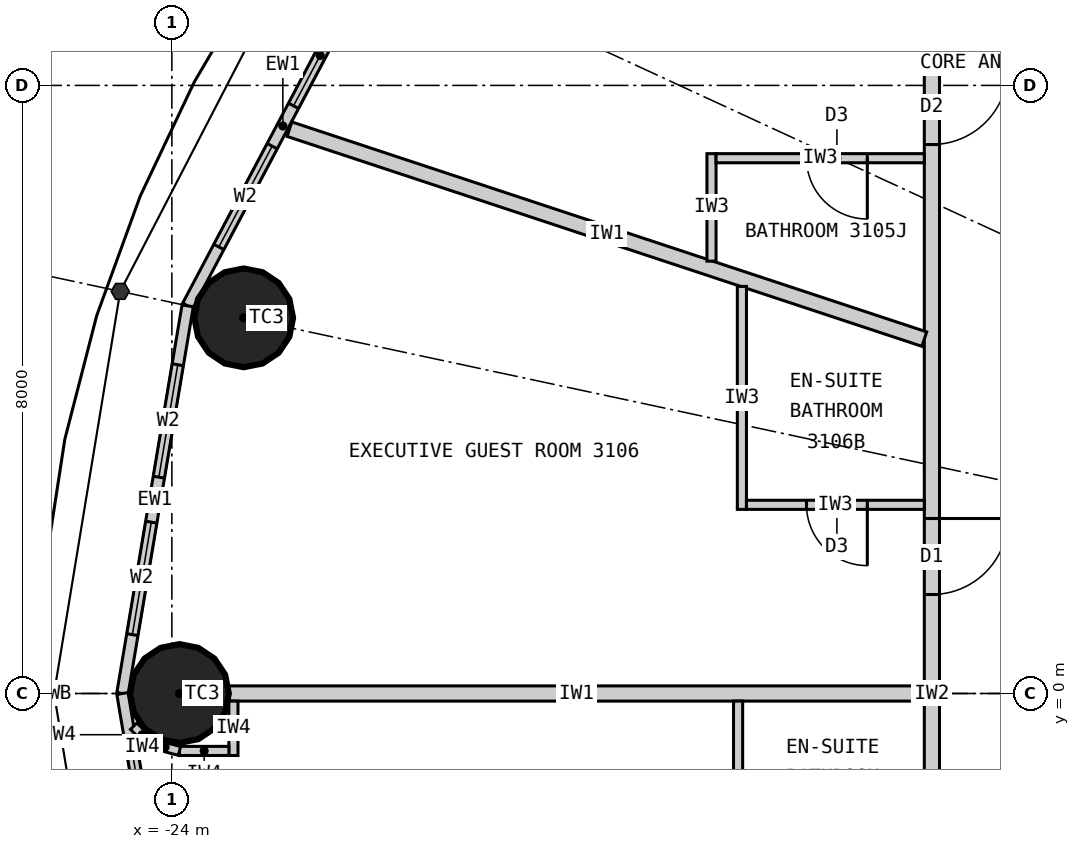
"""IFC4 building model, lengths in metres.
Left out: names, types, materials, properties, quantities, classifications, styles, units other than length and angle.
Written with IfcOpenShell. Run it as: python <this file> out.ifc"""

import sys

from ifc_helpers import new_model, si_unit, direction, frame, frame_2d, origin, origin_2d, place, context, subcontext, project, spatial, rectangle, circle, extrude, element, fill, save


model = new_model("IFC4")
c1 = context("Model", 3, precision=1e-05, world=origin(), true_north=direction((0.0, 1.0)))
c2 = subcontext(c1, "Body", "Model", "MODEL_VIEW")
j1 = project(units=[si_unit("LENGTHUNIT", "METRE"), si_unit("PLANEANGLEUNIT", "RADIAN")], contexts=[c1])
p1 = place(None, origin())
s1 = spatial("IfcSite", under=j1, at=p1, CompositionType="ELEMENT")
p2 = place(p1, origin())
s2 = spatial("IfcBuilding", under=s1, at=p2, CompositionType="ELEMENT")
p3 = place(p2, frame((0.0, 0.0, 122.1)))
s3 = spatial("IfcBuildingStorey", under=s2, at=p3, CompositionType="ELEMENT", Elevation=122.1)
for number, where, z_axis, x_axis in (
    (1, (-23.055, 4.942, 0.0), (0.0, 0.0, 1.0), (1.0, 0.0, 0.0)),
    (2, (-23.9, 0.0, 0.0), (0.0, 0.0, 1.0), (1.0, 0.0, 0.0)),
):
    element("IfcColumn", number, at=place(p3, frame(where, z_axis=z_axis, x_axis=x_axis)), inside=s3, PredefinedType="COLUMN", context=c2, shape_type="SweptSolid", body=[
        extrude(circle(Radius=0.65, at=origin_2d()), origin(), (0.0, 0.0, 1.0), 3.3),
    ])
p4 = place(p3, frame((-21.287, 9.832, 0.0), z_axis=(0.0, 0.0, 1.0), x_axis=(-0.467814388454, -0.883826735257, 0.0)))
e3 = element("IfcWall", 3, at=p4, inside=s3, PredefinedType="ELEMENTEDWALL", context=c2, shape_type="SweptSolid", body=[
    extrude(rectangle(XDim=5.354, YDim=0.15, at=frame_2d((2.677, 0.0))), origin(), (0.0, 0.0, 1.0), 3.12),
])
p5 = place(p4, frame((0.877, 0.0, 0.9)))
e4 = element("IfcOpeningElement", 4, at=p5, cuts=e3, PredefinedType="OPENING", context=c2, shape_type="SweptSolid", body=[
    extrude(rectangle(XDim=1.5, YDim=1.9, at=frame_2d((0.75, 0.95))), frame((0.0, 0.085, 0.0), z_axis=(0.0, -1.0, 0.0), x_axis=(1.0, 0.0, 0.0)), (0.0, 0.0, 1.0), 0.17),
])
p6 = place(p4, frame((2.977, 0.0, 0.9)))
e5 = element("IfcOpeningElement", 5, at=p6, cuts=e3, PredefinedType="OPENING", context=c2, shape_type="SweptSolid", body=[
    extrude(rectangle(XDim=1.5, YDim=1.9, at=frame_2d((0.75, 0.95))), frame((0.0, 0.085, 0.0), z_axis=(0.0, -1.0, 0.0), x_axis=(1.0, 0.0, 0.0)), (0.0, 0.0, 1.0), 0.17),
])
p7 = place(p3, frame((-23.792, 5.1, 0.0), z_axis=(0.0, 0.0, 1.0), x_axis=(-0.165883894218, -0.986145290329, 0.0)))
e6 = element("IfcWall", 6, at=p7, inside=s3, PredefinedType="ELEMENTEDWALL", context=c2, shape_type="SweptSolid", body=[
    extrude(rectangle(XDim=5.172, YDim=0.15, at=frame_2d((2.586, 0.0))), origin(), (0.0, 0.0, 1.0), 3.12),
])
p8 = place(p7, frame((0.786, 0.0, 0.9)))
e7 = element("IfcOpeningElement", 7, at=p8, cuts=e6, PredefinedType="OPENING", context=c2, shape_type="SweptSolid", body=[
    extrude(rectangle(XDim=1.5, YDim=1.9, at=frame_2d((0.75, 0.95))), frame((0.0, 0.085, 0.0), z_axis=(0.0, -1.0, 0.0), x_axis=(1.0, 0.0, 0.0)), (0.0, 0.0, 1.0), 0.17),
])
p9 = place(p7, frame((2.886, 0.0, 0.9)))
e8 = element("IfcOpeningElement", 8, at=p9, cuts=e6, PredefinedType="OPENING", context=c2, shape_type="SweptSolid", body=[
    extrude(rectangle(XDim=1.5, YDim=1.9, at=frame_2d((0.75, 0.95))), frame((0.0, 0.085, 0.0), z_axis=(0.0, -1.0, 0.0), x_axis=(1.0, 0.0, 0.0)), (0.0, 0.0, 1.0), 0.17),
])
p10 = place(p3, frame((-24.65, 0.0, 0.0), z_axis=(0.0, 0.0, 1.0), x_axis=(0.165883894218, -0.986145290329, 0.0)))
e9 = element("IfcWall", 9, at=p10, inside=s3, PredefinedType="ELEMENTEDWALL", context=c2, shape_type="SweptSolid", body=[
    extrude(rectangle(XDim=5.172, YDim=0.15, at=frame_2d((2.586, 0.0))), origin(), (0.0, 0.0, 1.0), 3.12),
])
p11 = place(p10, frame((0.786, 0.0, 0.9)))
e10 = element("IfcOpeningElement", 10, at=p11, cuts=e9, PredefinedType="OPENING", context=c2, shape_type="SweptSolid", body=[
    extrude(rectangle(XDim=1.5, YDim=1.9, at=frame_2d((0.75, 0.95))), frame((0.0, 0.085, 0.0), z_axis=(0.0, -1.0, 0.0), x_axis=(1.0, 0.0, 0.0)), (0.0, 0.0, 1.0), 0.17),
])
p12 = place(p10, frame((2.886, 0.0, 0.9)))
e11 = element("IfcOpeningElement", 11, at=p12, cuts=e9, PredefinedType="OPENING", context=c2, shape_type="SweptSolid", body=[
    extrude(rectangle(XDim=1.5, YDim=1.9, at=frame_2d((0.75, 0.95))), frame((0.0, 0.085, 0.0), z_axis=(0.0, -1.0, 0.0), x_axis=(1.0, 0.0, 0.0)), (0.0, 0.0, 1.0), 0.17),
])
p13 = place(p3, frame((-14.0, 9.9, 0.0), z_axis=(0.0, 0.0, 1.0), x_axis=(0.0, -1.0, 0.0)))
e12 = element("IfcWall", 12, at=p13, inside=s3, PredefinedType="PARTITIONING", context=c2, shape_type="SweptSolid", body=[
    extrude(rectangle(XDim=19.8, YDim=0.2, at=frame_2d((9.9, 0.0))), origin(), (0.0, 0.0, 1.0), 3.12),
])
p14 = place(p13, frame((1.678, 0.0, 0.0)))
e13 = element("IfcOpeningElement", 13, at=p14, cuts=e12, PredefinedType="OPENING", context=c2, shape_type="SweptSolid", body=[
    extrude(rectangle(XDim=1.0, YDim=2.2, at=frame_2d((0.5, 1.1))), frame((0.0, 0.11, 0.0), z_axis=(0.0, -1.0, 0.0), x_axis=(1.0, 0.0, 0.0)), (0.0, 0.0, 1.0), 0.22),
])
p15 = place(p13, frame((7.598, 0.0, 0.0)))
e14 = element("IfcOpeningElement", 14, at=p15, cuts=e12, PredefinedType="OPENING", context=c2, shape_type="SweptSolid", body=[
    extrude(rectangle(XDim=1.0, YDim=2.2, at=frame_2d((0.5, 1.1))), frame((0.0, 0.11, 0.0), z_axis=(0.0, -1.0, 0.0), x_axis=(1.0, 0.0, 0.0)), (0.0, 0.0, 1.0), 0.22),
])
p16 = place(p13, frame((12.26, 0.0, 0.0)))
e15 = element("IfcOpeningElement", 15, at=p16, cuts=e12, PredefinedType="OPENING", context=c2, shape_type="SweptSolid", body=[
    extrude(rectangle(XDim=1.0, YDim=2.2, at=frame_2d((0.5, 1.1))), frame((0.0, 0.11, 0.0), z_axis=(0.0, -1.0, 0.0), x_axis=(1.0, 0.0, 0.0)), (0.0, 0.0, 1.0), 0.22),
])
p17 = place(p13, frame((16.922, 0.0, 0.0)))
e16 = element("IfcOpeningElement", 16, at=p17, cuts=e12, PredefinedType="OPENING", context=c2, shape_type="SweptSolid", body=[
    extrude(rectangle(XDim=1.0, YDim=2.2, at=frame_2d((0.5, 1.1))), frame((0.0, 0.11, 0.0), z_axis=(0.0, -1.0, 0.0), x_axis=(1.0, 0.0, 0.0)), (0.0, 0.0, 1.0), 0.22),
])
p18 = place(p3, frame((-14.1, 4.662, 0.0), z_axis=(0.0, 0.0, 1.0), x_axis=(-0.949446466373, 0.313928984789, 0.0)))
e17 = element("IfcWall", 17, at=p18, inside=s3, PredefinedType="PARTITIONING", context=c2, shape_type="SweptSolid", body=[
    extrude(rectangle(XDim=8.797, YDim=0.2, at=frame_2d((4.399, 0.0))), origin(), (0.0, 0.0, 1.0), 3.12),
])
p19 = place(p3, frame((-14.1, 0.0, 0.0), z_axis=(0.0, 0.0, 1.0), x_axis=(-1.0, 0.0, 0.0)))
e18 = element("IfcWall", 18, at=p19, inside=s3, PredefinedType="PARTITIONING", context=c2, shape_type="SweptSolid", body=[
    extrude(rectangle(XDim=9.15, YDim=0.2, at=frame_2d((4.575, 0.0))), origin(), (0.0, 0.0, 1.0), 2.32),
])
p20 = place(p3, frame((-16.9, 5.688, 0.0), z_axis=(0.0, 0.0, 1.0), x_axis=(0.0, 1.0, 0.0)))
e19 = element("IfcWall", 19, at=p20, inside=s3, PredefinedType="PARTITIONING", context=c2, shape_type="SweptSolid", body=[
    extrude(rectangle(XDim=1.414, YDim=0.12, at=frame_2d((0.707, 0.0))), origin(), (0.0, 0.0, 1.0), 3.12),
])
p21 = place(p3, frame((-14.1, 7.042, 0.0), z_axis=(0.0, 0.0, 1.0), x_axis=(-1.0, 0.0, 0.0)))
e20 = element("IfcWall", 20, at=p21, inside=s3, PredefinedType="PARTITIONING", context=c2, shape_type="SweptSolid", body=[
    extrude(rectangle(XDim=2.74, YDim=0.12, at=frame_2d((1.37, 0.0))), origin(), (0.0, 0.0, 1.0), 3.12),
])
p22 = place(p21, frame((0.75, 0.0, 0.0)))
e21 = element("IfcOpeningElement", 21, at=p22, cuts=e20, PredefinedType="OPENING", context=c2, shape_type="SweptSolid", body=[
    extrude(rectangle(XDim=0.8, YDim=2.1, at=frame_2d((0.4, 1.05))), frame((0.0, 0.07, 0.0), z_axis=(0.0, -1.0, 0.0), x_axis=(1.0, 0.0, 0.0)), (0.0, 0.0, 1.0), 0.14),
])
p23 = place(p3, frame((-16.5, 5.356, 0.0), z_axis=(0.0, 0.0, 1.0), x_axis=(0.0, -1.0, 0.0)))
e22 = element("IfcWall", 22, at=p23, inside=s3, PredefinedType="PARTITIONING", context=c2, shape_type="SweptSolid", body=[
    extrude(rectangle(XDim=2.934, YDim=0.12, at=frame_2d((1.467, 0.0))), origin(), (0.0, 0.0, 1.0), 3.12),
])
p24 = place(p3, frame((-14.1, 2.482, 0.0), z_axis=(0.0, 0.0, 1.0), x_axis=(-1.0, 0.0, 0.0)))
e23 = element("IfcWall", 23, at=p24, inside=s3, PredefinedType="PARTITIONING", context=c2, shape_type="SweptSolid", body=[
    extrude(rectangle(XDim=2.34, YDim=0.12, at=frame_2d((1.17, 0.0))), origin(), (0.0, 0.0, 1.0), 3.12),
])
p25 = place(p24, frame((0.75, 0.0, 0.0)))
e24 = element("IfcOpeningElement", 24, at=p25, cuts=e23, PredefinedType="OPENING", context=c2, shape_type="SweptSolid", body=[
    extrude(rectangle(XDim=0.8, YDim=2.1, at=frame_2d((0.4, 1.05))), frame((0.0, 0.07, 0.0), z_axis=(0.0, -1.0, 0.0), x_axis=(1.0, 0.0, 0.0)), (0.0, 0.0, 1.0), 0.14),
])
p26 = place(p3, frame((-16.55, -0.1, 0.0), z_axis=(0.0, 0.0, 1.0), x_axis=(0.0, -1.0, 0.0)))
e25 = element("IfcWall", 25, at=p26, inside=s3, PredefinedType="PARTITIONING", context=c2, shape_type="SweptSolid", body=[
    extrude(rectangle(XDim=2.14, YDim=0.12, at=frame_2d((1.07, 0.0))), origin(), (0.0, 0.0, 1.0), 3.12),
])
p27 = place(p3, frame((-23.19, -0.1, 0.0), z_axis=(0.0, 0.0, 1.0), x_axis=(0.0, -1.0, 0.0)))
e26 = element("IfcWall", 26, at=p27, inside=s3, PredefinedType="PARTITIONING", context=c2, shape_type="SweptSolid", body=[
    extrude(rectangle(XDim=0.716, YDim=0.12, at=frame_2d((0.358, 0.0))), origin(), (0.0, 0.0, 1.0), 3.12),
])
p28 = place(p3, frame((-23.25, -0.756, 0.0), z_axis=(0.0, 0.0, 1.0), x_axis=(-1.0, 0.0, 0.0)))
e27 = element("IfcWall", 27, at=p28, inside=s3, PredefinedType="PARTITIONING", context=c2, shape_type="SweptSolid", body=[
    extrude(rectangle(XDim=0.65, YDim=0.12, at=frame_2d((0.325, 0.0))), origin(), (0.0, 0.0, 1.0), 3.12),
])
p29 = place(p3, frame((-23.9, -0.756, 0.0), z_axis=(0.0, 0.0, 1.0), x_axis=(-0.965892334856, 0.2589440045, 0.0)))
e28 = element("IfcWall", 28, at=p29, inside=s3, PredefinedType="PARTITIONING", context=c2, shape_type="SweptSolid", body=[
    extrude(rectangle(XDim=0.391, YDim=0.12, at=frame_2d((0.196, 0.0))), origin(), (0.0, 0.0, 1.0), 3.12),
])
p30 = place(p3, frame((-24.278, -0.655, 0.0), z_axis=(0.0, 0.0, 1.0), x_axis=(-0.707106781187, 0.707106781187, 0.0)))
e29 = element("IfcWall", 29, at=p30, inside=s3, PredefinedType="PARTITIONING", context=c2, shape_type="SweptSolid", body=[
    extrude(rectangle(XDim=0.318, YDim=0.12, at=frame_2d((0.159, 0.0))), origin(), (0.0, 0.0, 1.0), 3.12),
])
p31 = place(p5, origin())
e30 = element("IfcWindow", 30, at=p31, inside=s3, PartitioningType="SINGLE_PANEL", PredefinedType="WINDOW", context=c2, shape_type="SweptSolid", body=[
    extrude(rectangle(XDim=1.5, YDim=1.9, at=frame_2d((0.75, 0.95))), frame((0.0, 0.03, 0.0), z_axis=(0.0, -1.0, 0.0), x_axis=(1.0, 0.0, 0.0)), (0.0, 0.0, 1.0), 0.06),
])
fill(e4, e30)
p32 = place(p6, origin())
e31 = element("IfcWindow", 31, at=p32, inside=s3, PartitioningType="SINGLE_PANEL", PredefinedType="WINDOW", context=c2, shape_type="SweptSolid", body=[
    extrude(rectangle(XDim=1.5, YDim=1.9, at=frame_2d((0.75, 0.95))), frame((0.0, 0.03, 0.0), z_axis=(0.0, -1.0, 0.0), x_axis=(1.0, 0.0, 0.0)), (0.0, 0.0, 1.0), 0.06),
])
fill(e5, e31)
p33 = place(p8, origin())
e32 = element("IfcWindow", 32, at=p33, inside=s3, PartitioningType="SINGLE_PANEL", PredefinedType="WINDOW", context=c2, shape_type="SweptSolid", body=[
    extrude(rectangle(XDim=1.5, YDim=1.9, at=frame_2d((0.75, 0.95))), frame((0.0, 0.03, 0.0), z_axis=(0.0, -1.0, 0.0), x_axis=(1.0, 0.0, 0.0)), (0.0, 0.0, 1.0), 0.06),
])
fill(e7, e32)
p34 = place(p9, origin())
e33 = element("IfcWindow", 33, at=p34, inside=s3, PartitioningType="SINGLE_PANEL", PredefinedType="WINDOW", context=c2, shape_type="SweptSolid", body=[
    extrude(rectangle(XDim=1.5, YDim=1.9, at=frame_2d((0.75, 0.95))), frame((0.0, 0.03, 0.0), z_axis=(0.0, -1.0, 0.0), x_axis=(1.0, 0.0, 0.0)), (0.0, 0.0, 1.0), 0.06),
])
fill(e8, e33)
p35 = place(p11, origin())
e34 = element("IfcWindow", 34, at=p35, inside=s3, PartitioningType="SINGLE_PANEL", PredefinedType="WINDOW", context=c2, shape_type="SweptSolid", body=[
    extrude(rectangle(XDim=1.5, YDim=1.9, at=frame_2d((0.75, 0.95))), frame((0.0, 0.03, 0.0), z_axis=(0.0, -1.0, 0.0), x_axis=(1.0, 0.0, 0.0)), (0.0, 0.0, 1.0), 0.06),
])
fill(e10, e34)
p36 = place(p22, origin())
e35 = element("IfcDoor", 35, at=p36, inside=s3, OperationType="SINGLE_SWING_LEFT", PredefinedType="DOOR", context=c2, shape_type="SweptSolid", body=[
    extrude(rectangle(XDim=0.8, YDim=2.1, at=frame_2d((0.4, 1.05))), frame((0.0, 0.025, 0.0), z_axis=(0.0, -1.0, 0.0), x_axis=(1.0, 0.0, 0.0)), (0.0, 0.0, 1.0), 0.05),
])
fill(e21, e35)
p37 = place(p14, origin())
e36 = element("IfcDoor", 36, at=p37, inside=s3, OperationType="SINGLE_SWING_LEFT", PredefinedType="DOOR", context=c2, shape_type="SweptSolid", body=[
    extrude(rectangle(XDim=1.0, YDim=2.2, at=frame_2d((0.5, 1.1))), frame((0.0, 0.025, 0.0), z_axis=(0.0, -1.0, 0.0), x_axis=(1.0, 0.0, 0.0)), (0.0, 0.0, 1.0), 0.05),
])
fill(e13, e36)
p38 = place(p25, origin())
e37 = element("IfcDoor", 37, at=p38, inside=s3, OperationType="SINGLE_SWING_LEFT", PredefinedType="DOOR", context=c2, shape_type="SweptSolid", body=[
    extrude(rectangle(XDim=0.8, YDim=2.1, at=frame_2d((0.4, 1.05))), frame((0.0, 0.025, 0.0), z_axis=(0.0, -1.0, 0.0), x_axis=(1.0, 0.0, 0.0)), (0.0, 0.0, 1.0), 0.05),
])
fill(e24, e37)
p39 = place(p15, origin())
e38 = element("IfcDoor", 38, at=p39, inside=s3, OperationType="SINGLE_SWING_LEFT", PredefinedType="DOOR", context=c2, shape_type="SweptSolid", body=[
    extrude(rectangle(XDim=1.0, YDim=2.2, at=frame_2d((0.5, 1.1))), frame((0.0, 0.025, 0.0), z_axis=(0.0, -1.0, 0.0), x_axis=(1.0, 0.0, 0.0)), (0.0, 0.0, 1.0), 0.05),
])
fill(e14, e38)
save(model, sys.argv[1])
